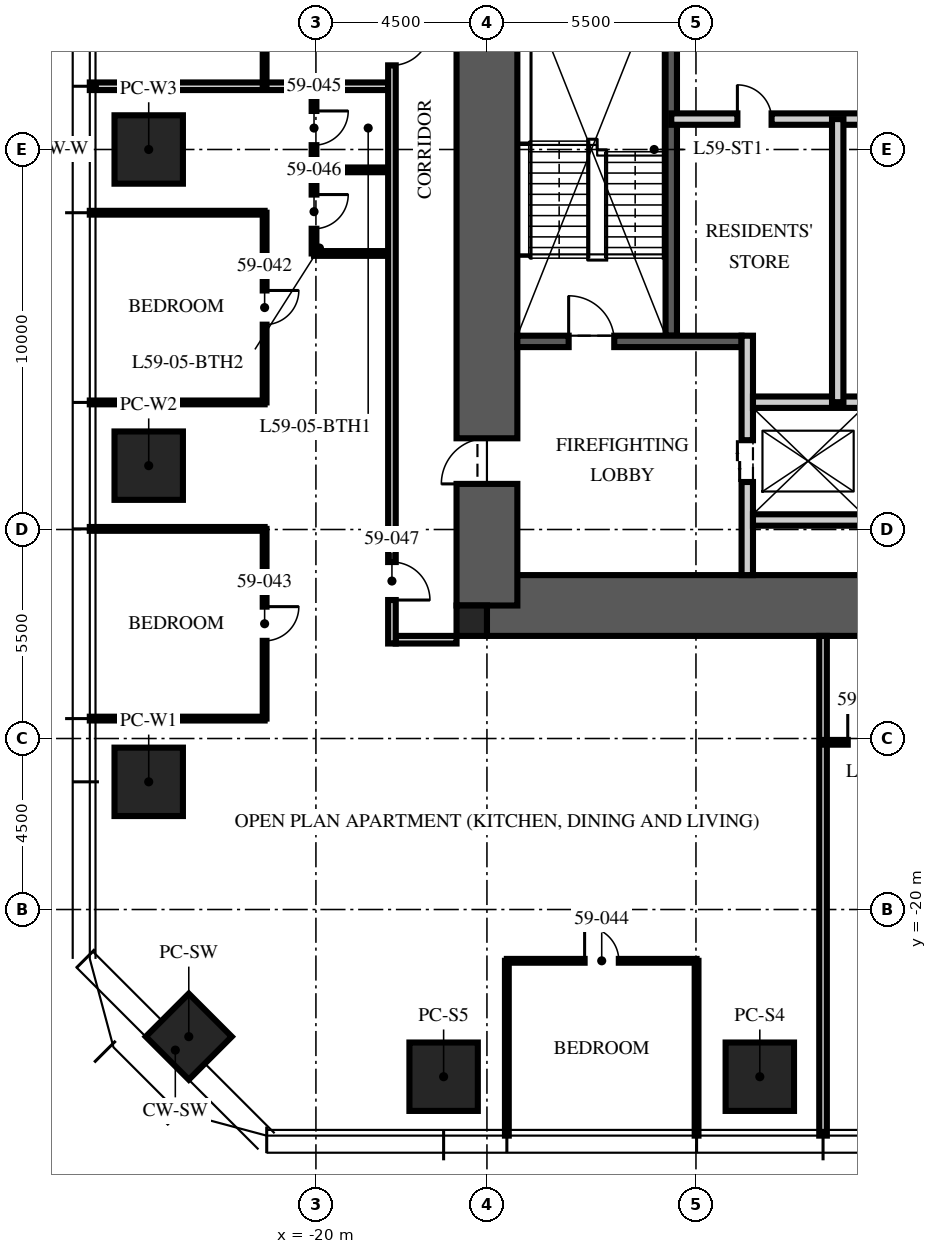
"""IFC4 building model, lengths in metres.
Left out: names, types, materials, properties, quantities, classifications, styles, units other than length and angle.
Written with IfcOpenShell. Run it as: python <this file> out.ifc"""

import sys

from ifc_helpers import new_model, si_unit, direction, frame, frame_2d, origin, origin_2d, place, context, subcontext, project, spatial, rectangle, extrude, element, fill, save


model = new_model("IFC4")
c1 = context("Model", 3, precision=1e-05, world=origin(), true_north=direction((0.0, 1.0)))
c2 = subcontext(c1, "Body", "Model", "MODEL_VIEW")
j1 = project(units=[si_unit("LENGTHUNIT", "METRE"), si_unit("PLANEANGLEUNIT", "RADIAN")], contexts=[c1])
p1 = place(None, origin())
s1 = spatial("IfcSite", under=j1, at=p1, CompositionType="ELEMENT")
p2 = place(p1, origin())
s2 = spatial("IfcBuilding", under=s1, at=p2, CompositionType="ELEMENT")
p3 = place(p2, frame((0.0, 0.0, 237.0)))
s3 = spatial("IfcBuildingStorey", under=s2, at=p3, CompositionType="ELEMENT", Elevation=237.0)
p4 = place(p3, frame((-15.5, -12.0, -0.25), z_axis=(0.0, 0.0, 1.0), x_axis=(1.0, 0.0, 0.0)))
e1 = element("IfcWall", 1, at=p4, inside=s3, PredefinedType="SHEAR", context=c2, shape_type="SweptSolid", body=[
    extrude(rectangle(XDim=31.0, YDim=1.6, at=frame_2d((15.5, 0.0))), origin(), (0.0, 0.0, 1.0), 3.75),
])
p5 = place(p3, frame((-15.5, -12.0, -0.25), z_axis=(0.0, 0.0, 1.0), x_axis=(0.0, 1.0, 0.0)))
e2 = element("IfcWall", 2, at=p5, inside=s3, PredefinedType="SHEAR", context=c2, shape_type="SweptSolid", body=[
    extrude(rectangle(XDim=24.0, YDim=1.6, at=frame_2d((12.0, 0.0))), origin(), (0.0, 0.0, 1.0), 3.75),
])
p6 = place(p5, frame((3.2, 0.0, 0.25)))
e3 = element("IfcOpeningElement", 3, at=p6, cuts=e2, PredefinedType="OPENING", context=c2, shape_type="SweptSolid", body=[
    extrude(rectangle(XDim=1.2, YDim=2.1, at=frame_2d((0.6, 1.05))), frame((0.0, 0.81, 0.0), z_axis=(0.0, -1.0, 0.0), x_axis=(1.0, 0.0, 0.0)), (0.0, 0.0, 1.0), 1.62),
])
p7 = place(p5, frame((19.3, 0.0, 0.25)))
e4 = element("IfcOpeningElement", 4, at=p7, cuts=e2, PredefinedType="OPENING", context=c2, shape_type="SweptSolid", body=[
    extrude(rectangle(XDim=1.8, YDim=2.1, at=frame_2d((0.9, 1.05))), frame((0.0, 0.81, 0.0), z_axis=(0.0, -1.0, 0.0), x_axis=(1.0, 0.0, 0.0)), (0.0, 0.0, 1.0), 1.62),
])
p8 = place(p3, frame((-15.9, -12.4, -0.25), z_axis=(0.0, 0.0, 1.0), x_axis=(1.0, 0.0, 0.0)))
e5 = element("IfcColumn", 5, at=p8, inside=s3, PredefinedType="COLUMN", context=c2, shape_type="SweptSolid", body=[
    extrude(rectangle(XDim=0.8, YDim=0.8, at=origin_2d()), origin(), (0.0, 0.0, 1.0), 3.75),
])
for number, where, z_axis, x_axis in (
    (6, (-8.32, -24.4, 0.0), (0.0, 0.0, 1.0), (1.0, 0.0, 0.0)),
    (7, (-16.64, -24.4, 0.0), (0.0, 0.0, 1.0), (1.0, 0.0, 0.0)),
    (8, (-24.4, -16.64, 0.0), (0.0, 0.0, 1.0), (0.0, 1.0, 0.0)),
    (9, (-24.4, -8.32, 0.0), (0.0, 0.0, 1.0), (0.0, 1.0, 0.0)),
    (10, (-24.4, 0.0, 0.0), (0.0, 0.0, 1.0), (0.0, 1.0, 0.0)),
):
    element("IfcColumn", number, at=place(p3, frame(where, z_axis=z_axis, x_axis=x_axis)), inside=s3, PredefinedType="COLUMN", context=c2, shape_type="SweptSolid", body=[
        extrude(rectangle(XDim=1.8, YDim=1.8, at=origin_2d()), origin(), (0.0, 0.0, 1.0), 3.75),
    ])
p9 = place(p3, frame((-23.346, -23.346, 0.0), z_axis=(0.0, 0.0, 1.0), x_axis=(0.707106781187, -0.707106781187, 0.0)))
e11 = element("IfcColumn", 11, at=p9, inside=s3, PredefinedType="COLUMN", context=c2, shape_type="SweptSolid", body=[
    extrude(rectangle(XDim=1.6, YDim=1.6, at=origin_2d()), origin(), (0.0, 0.0, 1.0), 3.75),
])
p10 = place(p3, frame((-10.65, -4.9, 0.0), z_axis=(0.0, 0.0, 1.0), x_axis=(0.0, 1.0, 0.0)))
e12 = element("IfcWall", 12, at=p10, inside=s3, PredefinedType="SOLIDWALL", context=c2, shape_type="SweptSolid", body=[
    extrude(rectangle(XDim=10.1, YDim=0.3, at=frame_2d((5.05, 0.0))), origin(), (0.0, 0.0, 1.0), 3.5),
])
p11 = place(p3, frame((-14.7, -5.05, 0.0), z_axis=(0.0, 0.0, 1.0), x_axis=(1.0, 0.0, 0.0)))
e13 = element("IfcWall", 13, at=p11, inside=s3, PredefinedType="SOLIDWALL", context=c2, shape_type="SweptSolid", body=[
    extrude(rectangle(XDim=5.9, YDim=0.3, at=frame_2d((2.95, 0.0))), origin(), (0.0, 0.0, 1.0), 3.5),
])
p12 = place(p11, frame((1.35, 0.0, 0.0)))
e14 = element("IfcOpeningElement", 14, at=p12, cuts=e13, PredefinedType="OPENING", context=c2, shape_type="SweptSolid", body=[
    extrude(rectangle(XDim=1.2, YDim=2.1, at=frame_2d((0.6, 1.05))), frame((0.0, 0.16, 0.0), z_axis=(0.0, -1.0, 0.0), x_axis=(1.0, 0.0, 0.0)), (0.0, 0.0, 1.0), 0.32),
])
p13 = place(p3, frame((-8.65, -11.2, 0.0), z_axis=(0.0, 0.0, 1.0), x_axis=(0.0, 1.0, 0.0)))
e15 = element("IfcWall", 15, at=p13, inside=s3, PredefinedType="PARTITIONING", context=c2, shape_type="SweptSolid", body=[
    extrude(rectangle(XDim=6.3, YDim=0.3, at=frame_2d((3.15, 0.0))), origin(), (0.0, 0.0, 1.0), 3.5),
])
p14 = place(p13, frame((2.45, 0.0, 0.0)))
e16 = element("IfcOpeningElement", 16, at=p14, cuts=e15, PredefinedType="OPENING", context=c2, shape_type="SweptSolid", body=[
    extrude(rectangle(XDim=1.1, YDim=2.1, at=frame_2d((0.55, 1.05))), frame((0.0, 0.16, 0.0), z_axis=(0.0, -1.0, 0.0), x_axis=(1.0, 0.0, 0.0)), (0.0, 0.0, 1.0), 0.32),
])
p15 = place(p3, frame((-8.5, -6.65, 0.0), z_axis=(0.0, 0.0, 1.0), x_axis=(1.0, 0.0, 0.0)))
e17 = element("IfcWall", 17, at=p15, inside=s3, PredefinedType="PARTITIONING", context=c2, shape_type="SweptSolid", body=[
    extrude(rectangle(XDim=17.0, YDim=0.3, at=frame_2d((8.5, 0.0))), origin(), (0.0, 0.0, 1.0), 3.5),
])
p16 = place(p15, frame((7.8, 0.0, 0.0)))
e18 = element("IfcOpeningElement", 18, at=p16, cuts=e17, PredefinedType="OPENING", context=c2, shape_type="SweptSolid", body=[
    extrude(rectangle(XDim=1.3, YDim=2.4, at=frame_2d((0.65, 1.2))), frame((0.0, 0.16, 0.0), z_axis=(0.0, -1.0, 0.0), x_axis=(1.0, 0.0, 0.0)), (0.0, 0.0, 1.0), 0.32),
])
p17 = place(p15, frame((5.65, 0.0, 0.0)))
e19 = element("IfcOpeningElement", 19, at=p17, cuts=e17, PredefinedType="OPENING", context=c2, shape_type="SweptSolid", body=[
    extrude(rectangle(XDim=0.9, YDim=2.1, at=frame_2d((0.45, 1.05))), frame((0.0, 0.16, 0.0), z_axis=(0.0, -1.0, 0.0), x_axis=(1.0, 0.0, 0.0)), (0.0, 0.0, 1.0), 0.32),
])
p18 = place(p15, frame((10.4, 0.0, 0.0)))
e20 = element("IfcOpeningElement", 20, at=p18, cuts=e17, PredefinedType="OPENING", context=c2, shape_type="SweptSolid", body=[
    extrude(rectangle(XDim=0.9, YDim=2.1, at=frame_2d((0.45, 1.05))), frame((0.0, 0.16, 0.0), z_axis=(0.0, -1.0, 0.0), x_axis=(1.0, 0.0, 0.0)), (0.0, 0.0, 1.0), 0.32),
])
p19 = place(p3, frame((-8.5, -9.75, 0.0), z_axis=(0.0, 0.0, 1.0), x_axis=(1.0, 0.0, 0.0)))
e21 = element("IfcWall", 21, at=p19, inside=s3, PredefinedType="PARTITIONING", context=c2, shape_type="SweptSolid", body=[
    extrude(rectangle(XDim=2.9, YDim=0.3, at=frame_2d((1.45, 0.0))), origin(), (0.0, 0.0, 1.0), 3.5),
])
p20 = place(p3, frame((-10.65, 0.8, 0.0), z_axis=(0.0, 0.0, 1.0), x_axis=(1.0, 0.0, 0.0)))
e22 = element("IfcWall", 22, at=p20, inside=s3, PredefinedType="PARTITIONING", context=c2, shape_type="SweptSolid", body=[
    extrude(rectangle(XDim=21.3, YDim=0.3, at=frame_2d((10.65, 0.0))), origin(), (0.0, 0.0, 1.0), 3.5),
])
p21 = place(p20, frame((10.05, 0.0, 0.0)))
e23 = element("IfcOpeningElement", 23, at=p21, cuts=e22, PredefinedType="OPENING", context=c2, shape_type="SweptSolid", body=[
    extrude(rectangle(XDim=1.2, YDim=2.1, at=frame_2d((0.6, 1.05))), frame((0.0, 0.16, 0.0), z_axis=(0.0, -1.0, 0.0), x_axis=(1.0, 0.0, 0.0)), (0.0, 0.0, 1.0), 0.32),
])
p22 = place(p20, frame((1.74, 0.0, 0.0)))
e24 = element("IfcOpeningElement", 24, at=p22, cuts=e22, PredefinedType="OPENING", context=c2, shape_type="SweptSolid", body=[
    extrude(rectangle(XDim=0.9, YDim=2.1, at=frame_2d((0.45, 1.05))), frame((0.0, 0.16, 0.0), z_axis=(0.0, -1.0, 0.0), x_axis=(1.0, 0.0, 0.0)), (0.0, 0.0, 1.0), 0.32),
])
p23 = place(p3, frame((-6.27, -6.65, 0.0), z_axis=(0.0, 0.0, 1.0), x_axis=(0.0, 1.0, 0.0)))
e25 = element("IfcWall", 25, at=p23, inside=s3, PredefinedType="PARTITIONING", context=c2, shape_type="SweptSolid", body=[
    extrude(rectangle(XDim=7.45, YDim=0.3, at=frame_2d((3.725, 0.0))), origin(), (0.0, 0.0, 1.0), 3.5),
])
p24 = place(p3, frame((-16.3, -12.9, 0.0), z_axis=(0.0, 0.0, 1.0), x_axis=(-1.0, 0.0, 0.0)))
e26 = element("IfcWall", 26, at=p24, inside=s3, PredefinedType="PARTITIONING", context=c2, shape_type="SweptSolid", body=[
    extrude(rectangle(XDim=1.6, YDim=0.2, at=frame_2d((0.8, 0.0))), origin(), (0.0, 0.0, 1.0), 2.3),
])
p25 = place(p3, frame((-18.1, 1.664, 0.0), z_axis=(0.0, 0.0, 1.0), x_axis=(-1.0, 0.0, 0.0)))
e27 = element("IfcWall", 27, at=p25, inside=s3, PredefinedType="PARTITIONING", context=c2, shape_type="SweptSolid", body=[
    extrude(rectangle(XDim=7.85, YDim=0.2, at=frame_2d((3.925, 0.0))), origin(), (0.0, 0.0, 1.0), 2.91),
])
for number, where, z_axis, x_axis in (
    (28, (-21.35, -1.664, 0.0), (0.0, 0.0, 1.0), (-1.0, 0.0, 0.0)),
    (29, (-21.35, -6.656, 0.0), (0.0, 0.0, 1.0), (-1.0, 0.0, 0.0)),
    (30, (-21.35, -9.984, 0.0), (0.0, 0.0, 1.0), (-1.0, 0.0, 0.0)),
    (31, (-21.35, -14.976, 0.0), (0.0, 0.0, 1.0), (-1.0, 0.0, 0.0)),
    (32, (-14.976, -21.35, 0.0), (0.0, 0.0, 1.0), (0.0, -1.0, 0.0)),
    (33, (-9.984, -21.35, 0.0), (0.0, 0.0, 1.0), (0.0, -1.0, 0.0)),
):
    element("IfcWall", number, at=place(p3, frame(where, z_axis=z_axis, x_axis=x_axis)), inside=s3, PredefinedType="PARTITIONING", context=c2, shape_type="SweptSolid", body=[
        extrude(rectangle(XDim=4.6, YDim=0.1, at=frame_2d((2.3, 0.0))), origin(), (0.0, 0.0, 1.0), 2.91),
    ])
p26 = place(p3, frame((-6.656, -12.8, 0.0), z_axis=(0.0, 0.0, 1.0), x_axis=(0.0, -1.0, 0.0)))
e34 = element("IfcWall", 34, at=p26, inside=s3, PredefinedType="PARTITIONING", context=c2, shape_type="SweptSolid", body=[
    extrude(rectangle(XDim=13.15, YDim=0.2, at=frame_2d((6.575, 0.0))), origin(), (0.0, 0.0, 1.0), 2.91),
])
p27 = place(p3, frame((-21.35, 6.656, 0.0), z_axis=(0.0, 0.0, 1.0), x_axis=(0.0, -1.0, 0.0)))
e35 = element("IfcWall", 35, at=p27, inside=s3, PredefinedType="PARTITIONING", context=c2, shape_type="SweptSolid", body=[
    extrude(rectangle(XDim=4.992, YDim=0.1, at=frame_2d((2.496, 0.0))), origin(), (0.0, 0.0, 1.0), 2.81),
])
p28 = place(p27, frame((2.046, 0.0, 0.0)))
e36 = element("IfcOpeningElement", 36, at=p28, cuts=e35, PredefinedType="OPENING", context=c2, shape_type="SweptSolid", body=[
    extrude(rectangle(XDim=0.9, YDim=2.1, at=frame_2d((0.45, 1.05))), frame((0.0, 0.06, 0.0), z_axis=(0.0, -1.0, 0.0), x_axis=(1.0, 0.0, 0.0)), (0.0, 0.0, 1.0), 0.12),
])
p29 = place(p3, frame((-21.35, -1.664, 0.0), z_axis=(0.0, 0.0, 1.0), x_axis=(0.0, -1.0, 0.0)))
e37 = element("IfcWall", 37, at=p29, inside=s3, PredefinedType="PARTITIONING", context=c2, shape_type="SweptSolid", body=[
    extrude(rectangle(XDim=4.992, YDim=0.1, at=frame_2d((2.496, 0.0))), origin(), (0.0, 0.0, 1.0), 2.81),
])
p30 = place(p29, frame((2.046, 0.0, 0.0)))
e38 = element("IfcOpeningElement", 38, at=p30, cuts=e37, PredefinedType="OPENING", context=c2, shape_type="SweptSolid", body=[
    extrude(rectangle(XDim=0.9, YDim=2.1, at=frame_2d((0.45, 1.05))), frame((0.0, 0.06, 0.0), z_axis=(0.0, -1.0, 0.0), x_axis=(1.0, 0.0, 0.0)), (0.0, 0.0, 1.0), 0.12),
])
p31 = place(p3, frame((-21.35, -9.984, 0.0), z_axis=(0.0, 0.0, 1.0), x_axis=(0.0, -1.0, 0.0)))
e39 = element("IfcWall", 39, at=p31, inside=s3, PredefinedType="PARTITIONING", context=c2, shape_type="SweptSolid", body=[
    extrude(rectangle(XDim=4.992, YDim=0.1, at=frame_2d((2.496, 0.0))), origin(), (0.0, 0.0, 1.0), 2.81),
])
p32 = place(p31, frame((2.046, 0.0, 0.0)))
e40 = element("IfcOpeningElement", 40, at=p32, cuts=e39, PredefinedType="OPENING", context=c2, shape_type="SweptSolid", body=[
    extrude(rectangle(XDim=0.9, YDim=2.1, at=frame_2d((0.45, 1.05))), frame((0.0, 0.06, 0.0), z_axis=(0.0, -1.0, 0.0), x_axis=(1.0, 0.0, 0.0)), (0.0, 0.0, 1.0), 0.12),
])
p33 = place(p3, frame((-14.976, -21.35, 0.0), z_axis=(0.0, 0.0, 1.0), x_axis=(1.0, 0.0, 0.0)))
e41 = element("IfcWall", 41, at=p33, inside=s3, PredefinedType="PARTITIONING", context=c2, shape_type="SweptSolid", body=[
    extrude(rectangle(XDim=4.992, YDim=0.1, at=frame_2d((2.496, 0.0))), origin(), (0.0, 0.0, 1.0), 2.81),
])
p34 = place(p33, frame((2.046, 0.0, 0.0)))
e42 = element("IfcOpeningElement", 42, at=p34, cuts=e41, PredefinedType="OPENING", context=c2, shape_type="SweptSolid", body=[
    extrude(rectangle(XDim=0.9, YDim=2.1, at=frame_2d((0.45, 1.05))), frame((0.0, 0.06, 0.0), z_axis=(0.0, -1.0, 0.0), x_axis=(1.0, 0.0, 0.0)), (0.0, 0.0, 1.0), 0.12),
])
p35 = place(p3, frame((-20.05, 1.664, 0.0), z_axis=(0.0, 0.0, 1.0), x_axis=(0.0, -1.0, 0.0)))
e43 = element("IfcWall", 43, at=p35, inside=s3, PredefinedType="PARTITIONING", context=c2, shape_type="SweptSolid", body=[
    extrude(rectangle(XDim=4.4, YDim=0.125, at=frame_2d((2.2, 0.0))), origin(), (0.0, 0.0, 1.0), 2.6),
])
p36 = place(p35, frame((0.65, 0.0, 0.0)))
e44 = element("IfcOpeningElement", 44, at=p36, cuts=e43, PredefinedType="OPENING", context=c2, shape_type="SweptSolid", body=[
    extrude(rectangle(XDim=0.9, YDim=2.1, at=frame_2d((0.45, 1.05))), frame((0.0, 0.073, 0.0), z_axis=(0.0, -1.0, 0.0), x_axis=(1.0, 0.0, 0.0)), (0.0, 0.0, 1.0), 0.145),
])
p37 = place(p35, frame((2.85, 0.0, 0.0)))
e45 = element("IfcOpeningElement", 45, at=p37, cuts=e43, PredefinedType="OPENING", context=c2, shape_type="SweptSolid", body=[
    extrude(rectangle(XDim=0.9, YDim=2.1, at=frame_2d((0.45, 1.05))), frame((0.0, 0.073, 0.0), z_axis=(0.0, -1.0, 0.0), x_axis=(1.0, 0.0, 0.0)), (0.0, 0.0, 1.0), 0.145),
])
for number, where, z_axis, x_axis in (
    (46, (-18.1, -0.536, 0.0), (0.0, 0.0, 1.0), (-1.0, 0.0, 0.0)),
    (47, (-18.1, -2.736, 0.0), (0.0, 0.0, 1.0), (-1.0, 0.0, 0.0)),
):
    element("IfcWall", number, at=place(p3, frame(where, z_axis=z_axis, x_axis=x_axis)), inside=s3, PredefinedType="PARTITIONING", context=c2, shape_type="SweptSolid", body=[
        extrude(rectangle(XDim=1.95, YDim=0.125, at=frame_2d((0.975, 0.0))), origin(), (0.0, 0.0, 1.0), 3.5),
    ])
p38 = place(p3, frame((-6.656, -15.6, 0.0), z_axis=(0.0, 0.0, 1.0), x_axis=(1.0, 0.0, 0.0)))
e48 = element("IfcWall", 48, at=p38, inside=s3, PredefinedType="PARTITIONING", context=c2, shape_type="SweptSolid", body=[
    extrude(rectangle(XDim=2.2, YDim=0.125, at=frame_2d((1.1, 0.0))), origin(), (0.0, 0.0, 1.0), 3.5),
])
p39 = place(p38, frame((0.65, 0.0, 0.0)))
e49 = element("IfcOpeningElement", 49, at=p39, cuts=e48, PredefinedType="OPENING", context=c2, shape_type="SweptSolid", body=[
    extrude(rectangle(XDim=0.9, YDim=2.1, at=frame_2d((0.45, 1.05))), frame((0.0, 0.073, 0.0), z_axis=(0.0, -1.0, 0.0), x_axis=(1.0, 0.0, 0.0)), (0.0, 0.0, 1.0), 0.145),
])
p40 = place(p3, frame((-18.0, 13.0, 0.0), z_axis=(0.0, 0.0, 1.0), x_axis=(0.0, -1.0, 0.0)))
e50 = element("IfcWall", 50, at=p40, inside=s3, PredefinedType="PARTITIONING", context=c2, shape_type="SweptSolid", body=[
    extrude(rectangle(XDim=26.0, YDim=0.2, at=frame_2d((13.0, 0.0))), origin(), (0.0, 0.0, 1.0), 2.6),
])
p41 = place(p40, frame((1.35, 0.0, 0.0)))
e51 = element("IfcOpeningElement", 51, at=p41, cuts=e50, PredefinedType="OPENING", context=c2, shape_type="SweptSolid", body=[
    extrude(rectangle(XDim=1.0, YDim=2.2, at=frame_2d((0.5, 1.1))), frame((0.0, 0.11, 0.0), z_axis=(0.0, -1.0, 0.0), x_axis=(1.0, 0.0, 0.0)), (0.0, 0.0, 1.0), 0.22),
])
p42 = place(p40, frame((9.786, 0.0, 0.0)))
e52 = element("IfcOpeningElement", 52, at=p42, cuts=e50, PredefinedType="OPENING", context=c2, shape_type="SweptSolid", body=[
    extrude(rectangle(XDim=1.0, YDim=2.2, at=frame_2d((0.5, 1.1))), frame((0.0, 0.11, 0.0), z_axis=(0.0, -1.0, 0.0), x_axis=(1.0, 0.0, 0.0)), (0.0, 0.0, 1.0), 0.22),
])
p43 = place(p40, frame((23.856, 0.0, 0.0)))
e53 = element("IfcOpeningElement", 53, at=p43, cuts=e50, PredefinedType="OPENING", context=c2, shape_type="SweptSolid", body=[
    extrude(rectangle(XDim=1.0, YDim=2.2, at=frame_2d((0.5, 1.1))), frame((0.0, 0.11, 0.0), z_axis=(0.0, -1.0, 0.0), x_axis=(1.0, 0.0, 0.0)), (0.0, 0.0, 1.0), 0.22),
])
p44 = place(p12, origin())
e54 = element("IfcDoor", 54, at=p44, inside=s3, OperationType="SINGLE_SWING_LEFT", PredefinedType="DOOR", context=c2, shape_type="SweptSolid", body=[
    extrude(rectangle(XDim=1.2, YDim=2.1, at=frame_2d((0.6, 1.05))), frame((0.0, 0.025, 0.0), z_axis=(0.0, -1.0, 0.0), x_axis=(1.0, 0.0, 0.0)), (0.0, 0.0, 1.0), 0.05),
])
fill(e14, e54)
p45 = place(p6, origin())
e55 = element("IfcDoor", 55, at=p45, inside=s3, OperationType="SINGLE_SWING_LEFT", PredefinedType="DOOR", context=c2, shape_type="SweptSolid", body=[
    extrude(rectangle(XDim=1.2, YDim=2.1, at=frame_2d((0.6, 1.05))), frame((0.0, 0.025, 0.0), z_axis=(0.0, -1.0, 0.0), x_axis=(1.0, 0.0, 0.0)), (0.0, 0.0, 1.0), 0.05),
])
fill(e3, e55)
p46 = place(p14, origin())
e56 = element("IfcDoor", 56, at=p46, inside=s3, OperationType="DOUBLE_DOOR_SLIDING", PredefinedType="DOOR", context=c2, shape_type="SweptSolid", body=[
    extrude(rectangle(XDim=1.1, YDim=2.1, at=frame_2d((0.55, 1.05))), frame((0.0, 0.025, 0.0), z_axis=(0.0, -1.0, 0.0), x_axis=(1.0, 0.0, 0.0)), (0.0, 0.0, 1.0), 0.05),
])
fill(e16, e56)
p47 = place(p22, origin())
e57 = element("IfcDoor", 57, at=p47, inside=s3, OperationType="SINGLE_SWING_LEFT", PredefinedType="DOOR", context=c2, shape_type="SweptSolid", body=[
    extrude(rectangle(XDim=0.9, YDim=2.1, at=frame_2d((0.45, 1.05))), frame((0.0, 0.025, 0.0), z_axis=(0.0, -1.0, 0.0), x_axis=(1.0, 0.0, 0.0)), (0.0, 0.0, 1.0), 0.05),
])
fill(e24, e57)
p48 = place(p42, origin())
e58 = element("IfcDoor", 58, at=p48, inside=s3, OperationType="SINGLE_SWING_LEFT", PredefinedType="DOOR", context=c2, shape_type="SweptSolid", body=[
    extrude(rectangle(XDim=1.0, YDim=2.2, at=frame_2d((0.5, 1.1))), frame((0.0, 0.025, 0.0), z_axis=(0.0, -1.0, 0.0), x_axis=(1.0, 0.0, 0.0)), (0.0, 0.0, 1.0), 0.05),
])
fill(e52, e58)
p49 = place(p30, origin())
e59 = element("IfcDoor", 59, at=p49, inside=s3, OperationType="SINGLE_SWING_LEFT", PredefinedType="DOOR", context=c2, shape_type="SweptSolid", body=[
    extrude(rectangle(XDim=0.9, YDim=2.1, at=frame_2d((0.45, 1.05))), frame((0.0, 0.025, 0.0), z_axis=(0.0, -1.0, 0.0), x_axis=(1.0, 0.0, 0.0)), (0.0, 0.0, 1.0), 0.05),
])
fill(e38, e59)
p50 = place(p32, origin())
e60 = element("IfcDoor", 60, at=p50, inside=s3, OperationType="SINGLE_SWING_LEFT", PredefinedType="DOOR", context=c2, shape_type="SweptSolid", body=[
    extrude(rectangle(XDim=0.9, YDim=2.1, at=frame_2d((0.45, 1.05))), frame((0.0, 0.025, 0.0), z_axis=(0.0, -1.0, 0.0), x_axis=(1.0, 0.0, 0.0)), (0.0, 0.0, 1.0), 0.05),
])
fill(e40, e60)
p51 = place(p34, origin())
e61 = element("IfcDoor", 61, at=p51, inside=s3, OperationType="SINGLE_SWING_LEFT", PredefinedType="DOOR", context=c2, shape_type="SweptSolid", body=[
    extrude(rectangle(XDim=0.9, YDim=2.1, at=frame_2d((0.45, 1.05))), frame((0.0, 0.025, 0.0), z_axis=(0.0, -1.0, 0.0), x_axis=(1.0, 0.0, 0.0)), (0.0, 0.0, 1.0), 0.05),
])
fill(e42, e61)
p52 = place(p36, origin())
e62 = element("IfcDoor", 62, at=p52, inside=s3, OperationType="SINGLE_SWING_LEFT", PredefinedType="DOOR", context=c2, shape_type="SweptSolid", body=[
    extrude(rectangle(XDim=0.9, YDim=2.1, at=frame_2d((0.45, 1.05))), frame((0.0, 0.025, 0.0), z_axis=(0.0, -1.0, 0.0), x_axis=(1.0, 0.0, 0.0)), (0.0, 0.0, 1.0), 0.05),
])
fill(e44, e62)
p53 = place(p37, origin())
e63 = element("IfcDoor", 63, at=p53, inside=s3, OperationType="SINGLE_SWING_LEFT", PredefinedType="DOOR", context=c2, shape_type="SweptSolid", body=[
    extrude(rectangle(XDim=0.9, YDim=2.1, at=frame_2d((0.45, 1.05))), frame((0.0, 0.025, 0.0), z_axis=(0.0, -1.0, 0.0), x_axis=(1.0, 0.0, 0.0)), (0.0, 0.0, 1.0), 0.05),
])
fill(e45, e63)
p54 = place(p43, origin())
e64 = element("IfcDoor", 64, at=p54, inside=s3, OperationType="SINGLE_SWING_RIGHT", PredefinedType="DOOR", context=c2, shape_type="SweptSolid", body=[
    extrude(rectangle(XDim=1.0, YDim=2.2, at=frame_2d((0.5, 1.1))), frame((0.0, 0.025, 0.0), z_axis=(0.0, -1.0, 0.0), x_axis=(1.0, 0.0, 0.0)), (0.0, 0.0, 1.0), 0.05),
])
fill(e53, e64)
p55 = place(p39, origin())
e65 = element("IfcDoor", 65, at=p55, inside=s3, OperationType="SINGLE_SWING_LEFT", PredefinedType="DOOR", context=c2, shape_type="SweptSolid", body=[
    extrude(rectangle(XDim=0.9, YDim=2.1, at=frame_2d((0.45, 1.05))), frame((0.0, 0.025, 0.0), z_axis=(0.0, -1.0, 0.0), x_axis=(1.0, 0.0, 0.0)), (0.0, 0.0, 1.0), 0.05),
])
fill(e49, e65)
save(model, sys.argv[1])
